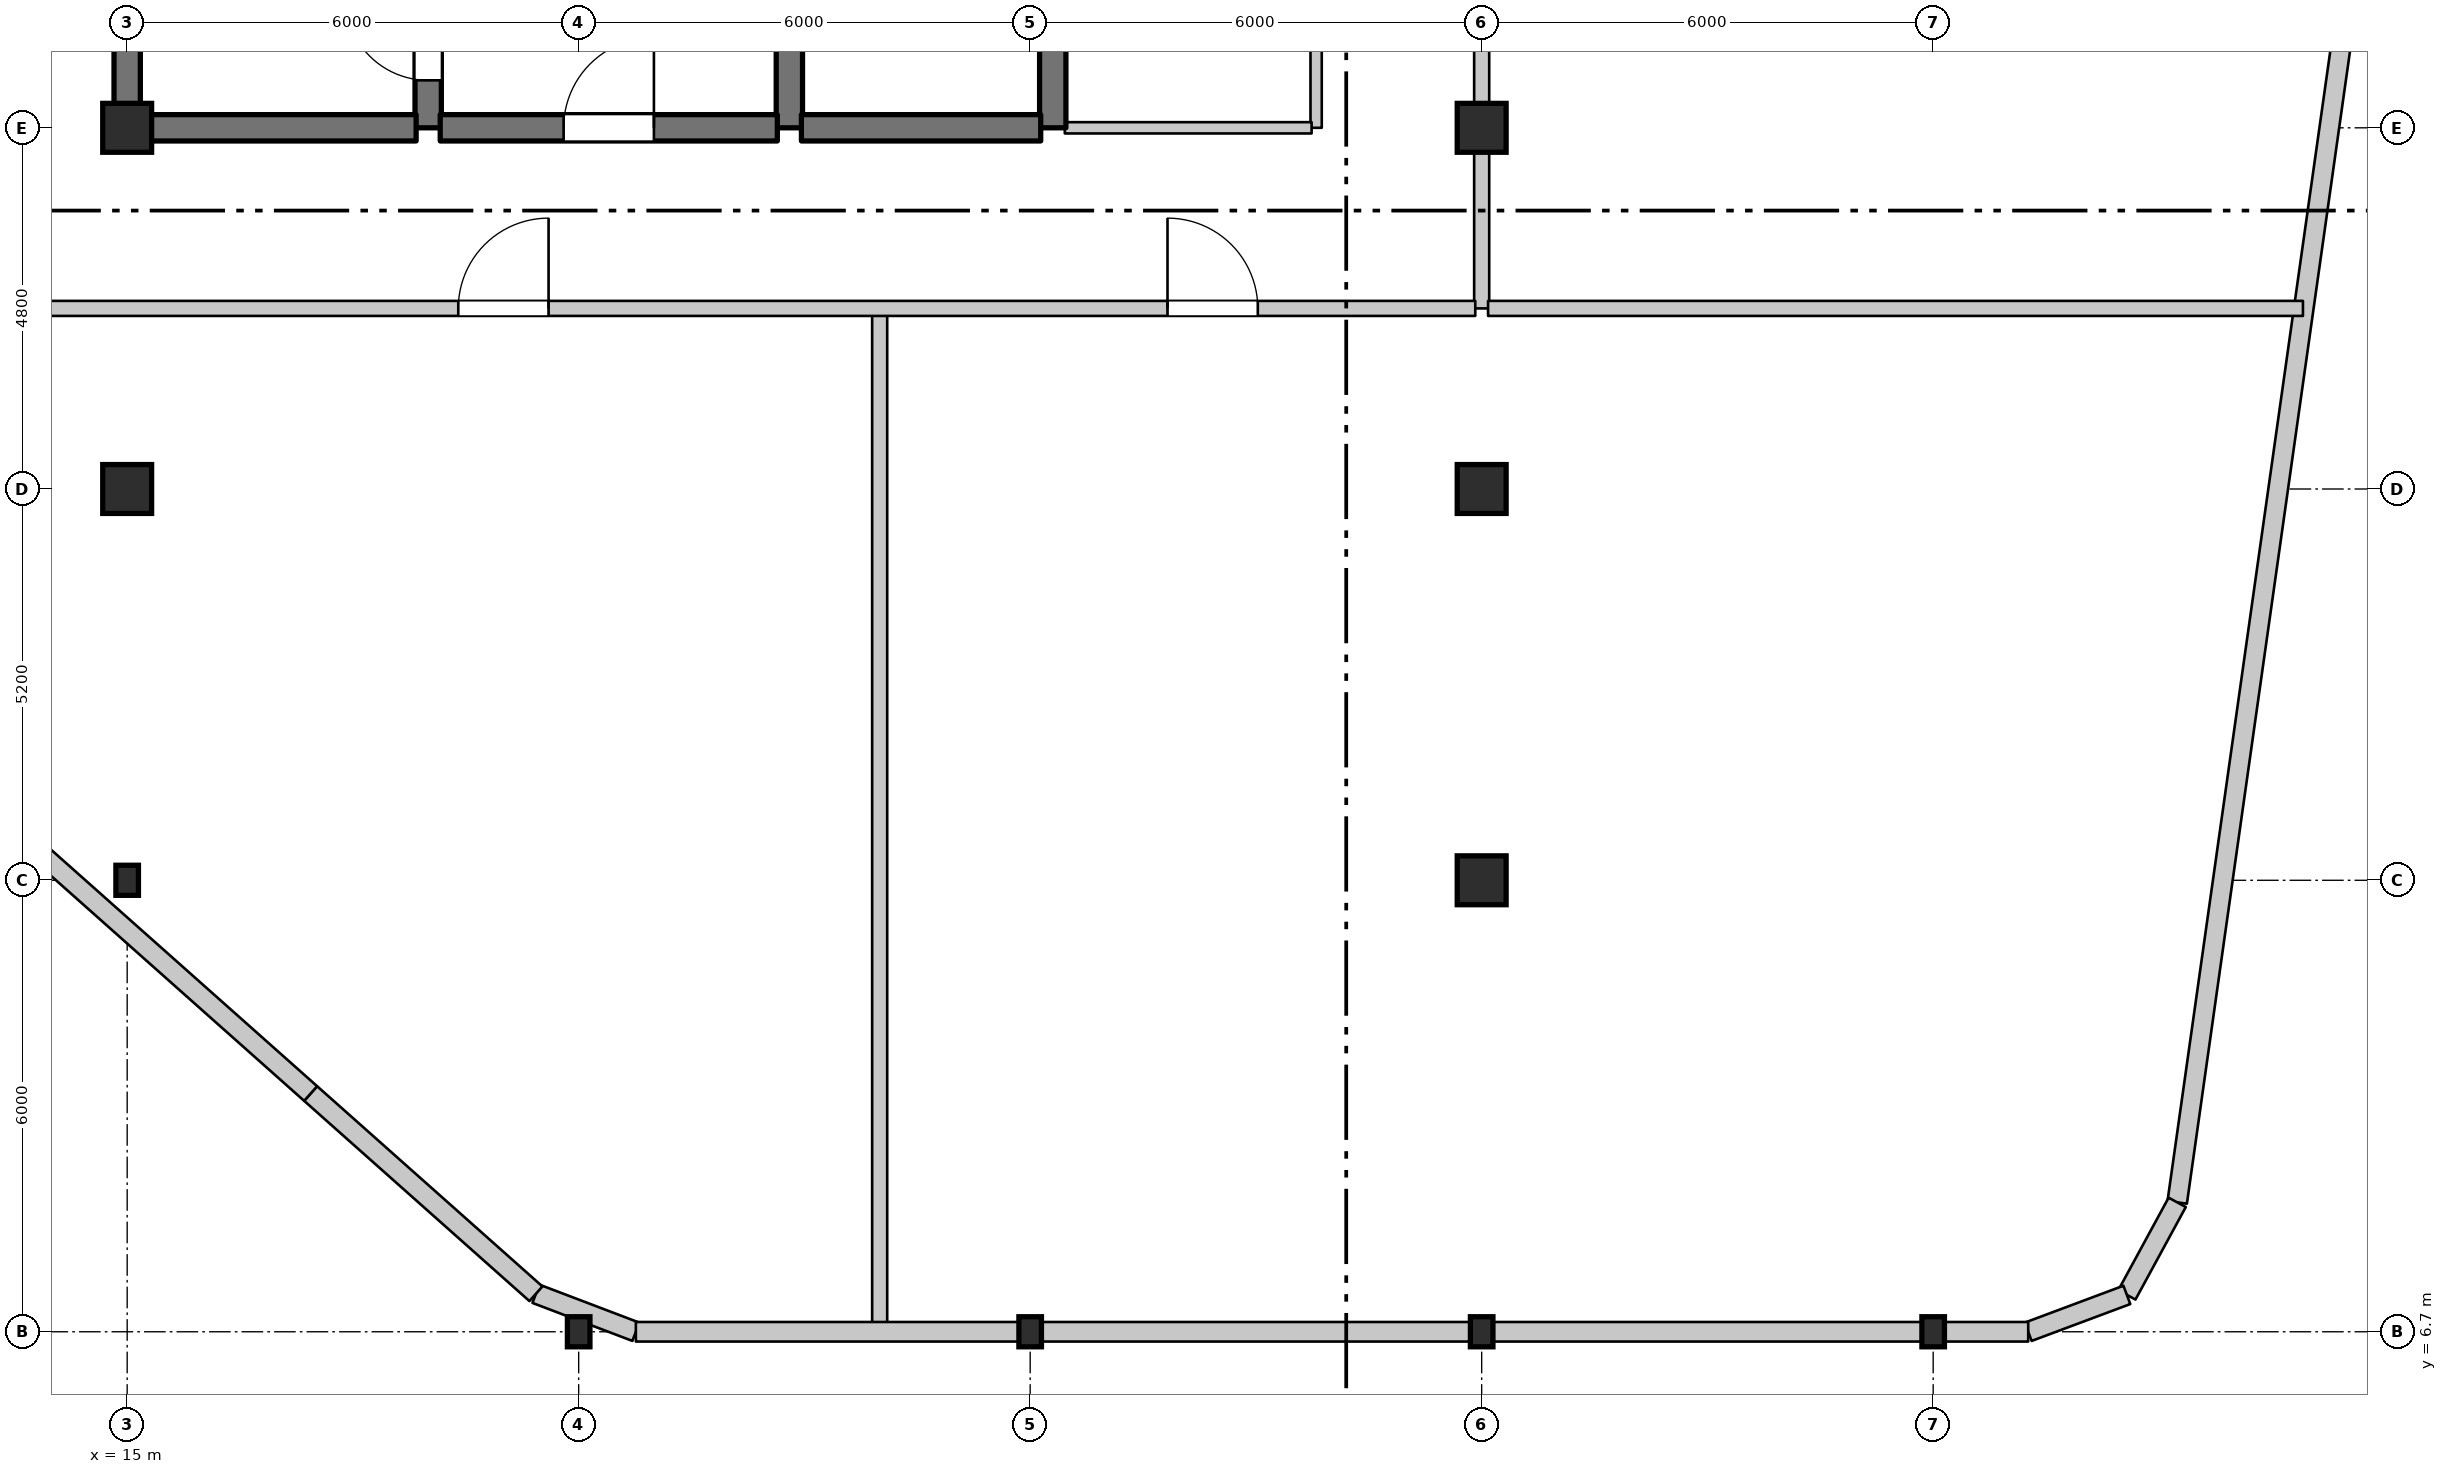
"""IFC4 building model, lengths in metres.
Left out: names, types, materials, properties, quantities, classifications, styles, units other than length and angle.
Written with IfcOpenShell. Run it as: python <this file> out.ifc"""

import sys

from ifc_helpers import new_model, si_unit, direction, frame, frame_2d, origin, origin_2d, place, context, subcontext, project, spatial, rectangle, i_section, extrude, element, fill, save


model = new_model("IFC4")
c1 = context("Model", 3, precision=1e-05, world=origin(), true_north=direction((0.0, 1.0)))
c2 = subcontext(c1, "Body", "Model", "MODEL_VIEW")
j1 = project(units=[si_unit("LENGTHUNIT", "METRE"), si_unit("PLANEANGLEUNIT", "RADIAN")], contexts=[c1])
p1 = place(None, origin())
s1 = spatial("IfcSite", under=j1, at=p1, CompositionType="ELEMENT")
p2 = place(p1, origin())
s2 = spatial("IfcBuilding", under=s1, at=p2, CompositionType="ELEMENT")
p3 = place(p2, frame((0.0, 0.0, 314.7)))
s3 = spatial("IfcBuildingStorey", under=s2, at=p3, CompositionType="ELEMENT", Elevation=314.7)
p4 = place(p3, frame((15.0, 12.7, 0.0), z_axis=(0.0, 0.0, 1.0), x_axis=(1.0, 0.0, 0.0)))
e1 = element("IfcColumn", 1, at=p4, inside=s3, PredefinedType="COLUMN", context=c2, shape_type="SweptSolid", body=[
    extrude(i_section(OverallWidth=0.3, OverallDepth=0.4, WebThickness=0.013, FlangeThickness=0.024, FilletRadius=0.027, at=origin_2d()), origin(), (0.0, 0.0, 1.0), 5.3),
])
for number, where, z_axis, x_axis in (
    (2, (15.0, 17.9, 0.0), (0.0, 0.0, 1.0), (1.0, 0.0, 0.0)),
    (3, (15.0, 22.7, 0.0), (0.0, 0.0, 1.0), (1.0, 0.0, 0.0)),
):
    element("IfcColumn", number, at=place(p3, frame(where, z_axis=z_axis, x_axis=x_axis)), inside=s3, PredefinedType="COLUMN", context=c2, shape_type="SweptSolid", body=[
        extrude(rectangle(XDim=0.65, YDim=0.65, at=origin_2d()), origin(), (0.0, 0.0, 1.0), 5.3),
    ])
for number, where, z_axis, x_axis in (
    (4, (21.0, 6.7, 0.0), (0.0, 0.0, 1.0), (1.0, 0.0, 0.0)),
    (5, (27.0, 6.7, 0.0), (0.0, 0.0, 1.0), (1.0, 0.0, 0.0)),
    (6, (33.0, 6.7, 0.0), (0.0, 0.0, 1.0), (1.0, 0.0, 0.0)),
):
    element("IfcColumn", number, at=place(p3, frame(where, z_axis=z_axis, x_axis=x_axis)), inside=s3, PredefinedType="COLUMN", context=c2, shape_type="SweptSolid", body=[
        extrude(i_section(OverallWidth=0.3, OverallDepth=0.4, WebThickness=0.013, FlangeThickness=0.024, FilletRadius=0.027, at=origin_2d()), origin(), (0.0, 0.0, 1.0), 5.3),
    ])
for number, where, z_axis, x_axis in (
    (7, (33.0, 12.7, 0.0), (0.0, 0.0, 1.0), (1.0, 0.0, 0.0)),
    (8, (33.0, 17.9, 0.0), (0.0, 0.0, 1.0), (1.0, 0.0, 0.0)),
    (9, (33.0, 22.7, 0.0), (0.0, 0.0, 1.0), (1.0, 0.0, 0.0)),
):
    element("IfcColumn", number, at=place(p3, frame(where, z_axis=z_axis, x_axis=x_axis)), inside=s3, PredefinedType="COLUMN", context=c2, shape_type="SweptSolid", body=[
        extrude(rectangle(XDim=0.65, YDim=0.65, at=origin_2d()), origin(), (0.0, 0.0, 1.0), 5.3),
    ])
p5 = place(p3, frame((39.0, 6.7, 0.0), z_axis=(0.0, 0.0, 1.0), x_axis=(1.0, 0.0, 0.0)))
e10 = element("IfcColumn", 10, at=p5, inside=s3, PredefinedType="COLUMN", context=c2, shape_type="SweptSolid", body=[
    extrude(i_section(OverallWidth=0.3, OverallDepth=0.4, WebThickness=0.013, FlangeThickness=0.024, FilletRadius=0.027, at=origin_2d()), origin(), (0.0, 0.0, 1.0), 5.3),
])
p6 = place(p3, frame((44.948, 27.532, 0.0), z_axis=(0.0, 0.0, 1.0), x_axis=(-0.140140996848, -0.990131557422, 0.0)))
e11 = element("IfcWall", 11, at=p6, inside=s3, PredefinedType="STANDARD", context=c2, shape_type="SweptSolid", body=[
    extrude(rectangle(XDim=19.302, YDim=0.26, at=frame_2d((9.651, 0.0))), origin(), (0.0, 0.0, 1.0), 4.99),
])
p7 = place(p3, frame((42.243, 8.42, 0.0), z_axis=(0.0, 0.0, 1.0), x_axis=(-0.477776668589, -0.878481334436, 0.0)))
e12 = element("IfcWall", 12, at=p7, inside=s3, PredefinedType="STANDARD", context=c2, shape_type="SweptSolid", body=[
    extrude(rectangle(XDim=1.4, YDim=0.26, at=frame_2d((0.7, 0.0))), origin(), (0.0, 0.0, 1.0), 4.99),
])
p8 = place(p3, frame((41.574, 7.19, 0.0), z_axis=(0.0, 0.0, 1.0), x_axis=(-0.936715710775, -0.350090955591, 0.0)))
e13 = element("IfcWall", 13, at=p8, inside=s3, PredefinedType="STANDARD", context=c2, shape_type="SweptSolid", body=[
    extrude(rectangle(XDim=1.4, YDim=0.26, at=frame_2d((0.7, 0.0))), origin(), (0.0, 0.0, 1.0), 4.99),
])
p9 = place(p3, frame((40.263, 6.7, 0.0), z_axis=(0.0, 0.0, 1.0), x_axis=(-1.0, 0.0, 0.0)))
e14 = element("IfcWall", 14, at=p9, inside=s3, PredefinedType="STANDARD", context=c2, shape_type="SweptSolid", body=[
    extrude(rectangle(XDim=1.263, YDim=0.26, at=frame_2d((0.631, 0.0))), origin(), (0.0, 0.0, 1.0), 4.99),
])
p10 = place(p3, frame((21.76, 6.7, 0.0), z_axis=(0.0, 0.0, 1.0), x_axis=(-0.934680848086, 0.355487991671, 0.0)))
e15 = element("IfcWall", 15, at=p10, inside=s3, PredefinedType="STANDARD", context=c2, shape_type="SweptSolid", body=[
    extrude(rectangle(XDim=1.421, YDim=0.26, at=frame_2d((0.71, 0.0))), origin(), (0.0, 0.0, 1.0), 4.99),
])
p11 = place(p3, frame((20.432, 7.205, 0.0), z_axis=(0.0, 0.0, 1.0), x_axis=(-0.747395867011, 0.664378971654, 0.0)))
e16 = element("IfcWall", 16, at=p11, inside=s3, PredefinedType="STANDARD", context=c2, shape_type="SweptSolid", body=[
    extrude(rectangle(XDim=4.005, YDim=0.26, at=frame_2d((2.003, 0.0))), origin(), (0.0, 0.0, 1.0), 4.65),
])
p12 = place(p3, frame((15.0, 22.7, 0.0), z_axis=(0.0, 0.0, 1.0), x_axis=(0.0, 1.0, 0.0)))
e17 = element("IfcWall", 17, at=p12, inside=s3, PredefinedType="SHEAR", context=c2, shape_type="SweptSolid", body=[
    extrude(rectangle(XDim=6.8, YDim=0.35, at=frame_2d((3.4, 0.0))), origin(), (0.0, 0.0, 1.0), 4.99),
])
p13 = place(p3, frame((19.0, 22.7, 0.0), z_axis=(0.0, 0.0, 1.0), x_axis=(0.0, 1.0, 0.0)))
e18 = element("IfcWall", 18, at=p13, inside=s3, PredefinedType="SHEAR", context=c2, shape_type="SweptSolid", body=[
    extrude(rectangle(XDim=5.5, YDim=0.35, at=frame_2d((2.75, 0.0))), origin(), (0.0, 0.0, 1.0), 4.99),
])
p14 = place(p13, frame((0.631, 0.0, 0.0)))
e19 = element("IfcOpeningElement", 19, at=p14, cuts=e18, PredefinedType="OPENING", context=c2, shape_type="SweptSolid", body=[
    extrude(rectangle(XDim=1.1, YDim=2.15, at=frame_2d((0.55, 1.075))), frame((0.0, 0.185, 0.0), z_axis=(0.0, -1.0, 0.0), x_axis=(1.0, 0.0, 0.0)), (0.0, 0.0, 1.0), 0.37),
])
p15 = place(p3, frame((23.8, 22.7, 0.0), z_axis=(0.0, 0.0, 1.0), x_axis=(0.0, 1.0, 0.0)))
e20 = element("IfcWall", 20, at=p15, inside=s3, PredefinedType="SHEAR", context=c2, shape_type="SweptSolid", body=[
    extrude(rectangle(XDim=3.4, YDim=0.35, at=frame_2d((1.7, 0.0))), origin(), (0.0, 0.0, 1.0), 4.99),
])
p16 = place(p15, frame((1.25, 0.0, 0.0)))
e21 = element("IfcOpeningElement", 21, at=p16, cuts=e20, PredefinedType="OPENING", context=c2, shape_type="SweptSolid", body=[
    extrude(rectangle(XDim=0.9, YDim=2.15, at=frame_2d((0.45, 1.075))), frame((0.0, 0.185, 0.0), z_axis=(0.0, -1.0, 0.0), x_axis=(1.0, 0.0, 0.0)), (0.0, 0.0, 1.0), 0.37),
])
p17 = place(p3, frame((25.0, 6.71, 0.0), z_axis=(0.0, 0.0, 1.0), x_axis=(0.0, 1.0, 0.0)))
e22 = element("IfcWall", 22, at=p17, inside=s3, PredefinedType="STANDARD", context=c2, shape_type="SweptSolid", body=[
    extrude(rectangle(XDim=13.59, YDim=0.2, at=frame_2d((6.795, 0.0))), origin(), (0.0, 0.0, 1.0), 4.99),
])
p18 = place(p3, frame((27.3, 22.7, 0.0), z_axis=(0.0, 0.0, 1.0), x_axis=(0.0, 1.0, 0.0)))
e23 = element("IfcWall", 23, at=p18, inside=s3, PredefinedType="SHEAR", context=c2, shape_type="SweptSolid", body=[
    extrude(rectangle(XDim=2.9, YDim=0.35, at=frame_2d((1.45, 0.0))), origin(), (0.0, 0.0, 1.0), 4.99),
])
p19 = place(p3, frame((30.8, 22.7, 0.0), z_axis=(0.0, 0.0, 1.0), x_axis=(0.0, 1.0, 0.0)))
e24 = element("IfcWall", 24, at=p19, inside=s3, PredefinedType="STANDARD", context=c2, shape_type="SweptSolid", body=[
    extrude(rectangle(XDim=2.9, YDim=0.15, at=frame_2d((1.45, 0.0))), origin(), (0.0, 0.0, 1.0), 4.99),
])
p20 = place(p3, frame((33.0, 20.3, 0.0), z_axis=(0.0, 0.0, 1.0), x_axis=(0.0, 1.0, 0.0)))
e25 = element("IfcWall", 25, at=p20, inside=s3, PredefinedType="STANDARD", context=c2, shape_type="SweptSolid", body=[
    extrude(rectangle(XDim=7.6, YDim=0.2, at=frame_2d((3.8, 0.0))), origin(), (0.0, 0.0, 1.0), 4.7),
])
p21 = place(p20, frame((4.6, 0.0, 0.0)))
e26 = element("IfcOpeningElement", 26, at=p21, cuts=e25, PredefinedType="OPENING", context=c2, shape_type="SweptSolid", body=[
    extrude(rectangle(XDim=1.2, YDim=2.2, at=frame_2d((0.6, 1.1))), frame((0.0, 0.11, 0.0), z_axis=(0.0, -1.0, 0.0), x_axis=(1.0, 0.0, 0.0)), (0.0, 0.0, 1.0), 0.22),
])
p22 = place(p3, frame((12.685, 20.3, 0.0), z_axis=(0.0, 0.0, 1.0), x_axis=(1.0, 0.0, 0.0)))
e27 = element("IfcWall", 27, at=p22, inside=s3, PredefinedType="STANDARD", context=c2, shape_type="SweptSolid", body=[
    extrude(rectangle(XDim=20.23, YDim=0.2, at=frame_2d((10.115, 0.0))), origin(), (0.0, 0.0, 1.0), 4.99),
])
p23 = place(p22, frame((6.715, 0.0, 0.0)))
e28 = element("IfcOpeningElement", 28, at=p23, cuts=e27, PredefinedType="OPENING", context=c2, shape_type="SweptSolid", body=[
    extrude(rectangle(XDim=1.2, YDim=2.2, at=frame_2d((0.6, 1.1))), frame((0.0, 0.11, 0.0), z_axis=(0.0, -1.0, 0.0), x_axis=(1.0, 0.0, 0.0)), (0.0, 0.0, 1.0), 0.22),
])
p24 = place(p22, frame((16.14, 0.0, 0.0)))
e29 = element("IfcOpeningElement", 29, at=p24, cuts=e27, PredefinedType="OPENING", context=c2, shape_type="SweptSolid", body=[
    extrude(rectangle(XDim=1.2, YDim=2.2, at=frame_2d((0.6, 1.1))), frame((0.0, 0.11, 0.0), z_axis=(0.0, -1.0, 0.0), x_axis=(1.0, 0.0, 0.0)), (0.0, 0.0, 1.0), 0.22),
])
p25 = place(p3, frame((33.085, 20.3, 0.0), z_axis=(0.0, 0.0, 1.0), x_axis=(1.0, 0.0, 0.0)))
e30 = element("IfcWall", 30, at=p25, inside=s3, PredefinedType="STANDARD", context=c2, shape_type="SweptSolid", body=[
    extrude(rectangle(XDim=10.829, YDim=0.2, at=frame_2d((5.415, 0.0))), origin(), (0.0, 0.0, 1.0), 4.99),
])
p26 = place(p3, frame((15.16, 22.7, 0.0), z_axis=(0.0, 0.0, 1.0), x_axis=(1.0, 0.0, 0.0)))
e31 = element("IfcWall", 31, at=p26, inside=s3, PredefinedType="SHEAR", context=c2, shape_type="SweptSolid", body=[
    extrude(rectangle(XDim=3.68, YDim=0.35, at=frame_2d((1.84, 0.0))), origin(), (0.0, 0.0, 1.0), 4.99),
])
p27 = place(p3, frame((19.16, 22.7, 0.0), z_axis=(0.0, 0.0, 1.0), x_axis=(1.0, 0.0, 0.0)))
e32 = element("IfcWall", 32, at=p27, inside=s3, PredefinedType="SHEAR", context=c2, shape_type="SweptSolid", body=[
    extrude(rectangle(XDim=4.48, YDim=0.35, at=frame_2d((2.24, 0.0))), origin(), (0.0, 0.0, 1.0), 4.99),
])
p28 = place(p27, frame((1.64, 0.0, 0.0)))
e33 = element("IfcOpeningElement", 33, at=p28, cuts=e32, PredefinedType="OPENING", context=c2, shape_type="SweptSolid", body=[
    extrude(rectangle(XDim=1.2, YDim=2.2, at=frame_2d((0.6, 1.1))), frame((0.0, 0.185, 0.0), z_axis=(0.0, -1.0, 0.0), x_axis=(1.0, 0.0, 0.0)), (0.0, 0.0, 1.0), 0.37),
])
p29 = place(p3, frame((23.96, 22.7, 0.0), z_axis=(0.0, 0.0, 1.0), x_axis=(1.0, 0.0, 0.0)))
e34 = element("IfcWall", 34, at=p29, inside=s3, PredefinedType="SHEAR", context=c2, shape_type="SweptSolid", body=[
    extrude(rectangle(XDim=3.18, YDim=0.35, at=frame_2d((1.59, 0.0))), origin(), (0.0, 0.0, 1.0), 4.99),
])
p30 = place(p3, frame((27.46, 22.7, 0.0), z_axis=(0.0, 0.0, 1.0), x_axis=(1.0, 0.0, 0.0)))
e35 = element("IfcWall", 35, at=p30, inside=s3, PredefinedType="STANDARD", context=c2, shape_type="SweptSolid", body=[
    extrude(rectangle(XDim=3.28, YDim=0.15, at=frame_2d((1.64, 0.0))), origin(), (0.0, 0.0, 1.0), 4.99),
])
p31 = place(p3, frame((39.0, 6.7, 0.0), z_axis=(0.0, 0.0, 1.0), x_axis=(-1.0, 0.0, 0.0)))
e36 = element("IfcWall", 36, at=p31, inside=s3, PredefinedType="STANDARD", context=c2, shape_type="SweptSolid", body=[
    extrude(rectangle(XDim=17.24, YDim=0.26, at=frame_2d((8.62, 0.0))), origin(), (0.0, 0.0, 1.0), 4.64),
])
p32 = place(p3, frame((17.438, 9.866, 0.0), z_axis=(0.0, 0.0, 1.0), x_axis=(-0.747416078768, 0.664356233657, 0.0)))
e37 = element("IfcWall", 37, at=p32, inside=s3, PredefinedType="STANDARD", context=c2, shape_type="SweptSolid", body=[
    extrude(rectangle(XDim=17.933, YDim=0.26, at=frame_2d((8.966, 0.0))), origin(), (0.0, 0.0, 1.0), 4.99),
])
p33 = place(p14, origin())
e38 = element("IfcDoor", 38, at=p33, inside=s3, OperationType="SINGLE_SWING_RIGHT", PredefinedType="DOOR", context=c2, shape_type="SweptSolid", body=[
    extrude(rectangle(XDim=1.1, YDim=2.15, at=frame_2d((0.55, 1.075))), frame((0.0, 0.025, 0.0), z_axis=(0.0, -1.0, 0.0), x_axis=(1.0, 0.0, 0.0)), (0.0, 0.0, 1.0), 0.05),
])
fill(e19, e38)
p34 = place(p23, origin())
e39 = element("IfcDoor", 39, at=p34, inside=s3, OperationType="SINGLE_SWING_RIGHT", PredefinedType="DOOR", context=c2, shape_type="SweptSolid", body=[
    extrude(rectangle(XDim=1.2, YDim=2.2, at=frame_2d((0.6, 1.1))), frame((0.0, 0.025, 0.0), z_axis=(0.0, -1.0, 0.0), x_axis=(1.0, 0.0, 0.0)), (0.0, 0.0, 1.0), 0.05),
])
fill(e28, e39)
p35 = place(p24, origin())
e40 = element("IfcDoor", 40, at=p35, inside=s3, OperationType="SINGLE_SWING_LEFT", PredefinedType="DOOR", context=c2, shape_type="SweptSolid", body=[
    extrude(rectangle(XDim=1.2, YDim=2.2, at=frame_2d((0.6, 1.1))), frame((0.0, 0.025, 0.0), z_axis=(0.0, -1.0, 0.0), x_axis=(1.0, 0.0, 0.0)), (0.0, 0.0, 1.0), 0.05),
])
fill(e29, e40)
p36 = place(p28, origin())
e41 = element("IfcDoor", 41, at=p36, inside=s3, OperationType="SINGLE_SWING_RIGHT", PredefinedType="DOOR", context=c2, shape_type="SweptSolid", body=[
    extrude(rectangle(XDim=1.2, YDim=2.2, at=frame_2d((0.6, 1.1))), frame((0.0, 0.025, 0.0), z_axis=(0.0, -1.0, 0.0), x_axis=(1.0, 0.0, 0.0)), (0.0, 0.0, 1.0), 0.05),
])
fill(e33, e41)
save(model, sys.argv[1])
